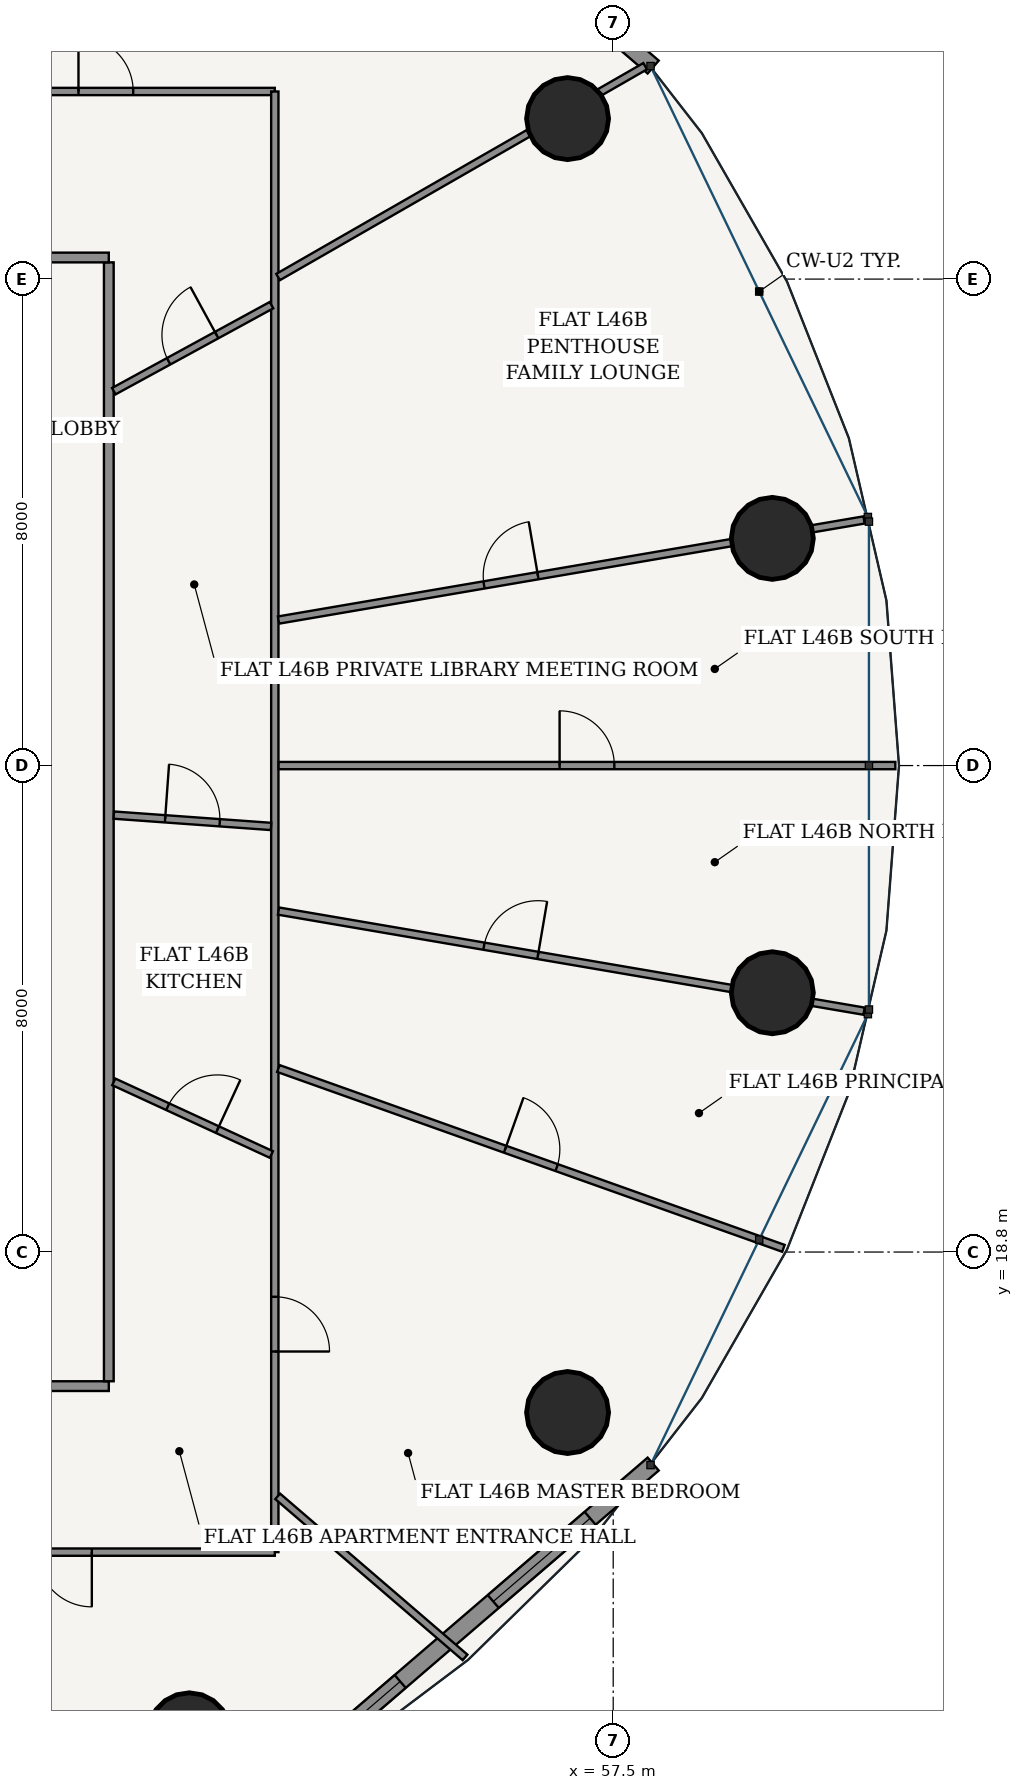
"""IFC4 building model, lengths in metres.
Left out: names, types, materials, properties, quantities, classifications, styles, units other than length and angle.
Written with IfcOpenShell. Run it as: python <this file> out.ifc"""

import sys

from ifc_helpers import new_model, si_unit, direction, frame, frame_2d, origin, origin_2d, place, context, subcontext, project, spatial, rectangle, hollow_circle, extrude, source, transform, mapped, element, fill, save


model = new_model("IFC4")
c1 = context("Model", 3, precision=1e-05, world=origin(), true_north=direction((-0.2419218956, 0.970295726276)))
c2 = subcontext(c1, "Body", "Model", "MODEL_VIEW")
j1 = project(units=[si_unit("LENGTHUNIT", "METRE"), si_unit("PLANEANGLEUNIT", "RADIAN")], contexts=[c1])
p1 = place(None, origin())
s1 = spatial("IfcSite", under=j1, at=p1, CompositionType="ELEMENT")
p2 = place(p1, origin())
s2 = spatial("IfcBuilding", under=s1, at=p2, CompositionType="ELEMENT")
p3 = place(p2, frame((0.0, 0.0, 175.0)))
s3 = spatial("IfcBuildingStorey", under=s2, at=p3, CompositionType="ELEMENT", Elevation=175.0)
for number, where, z_axis, x_axis in (
    (1, (60.117, 30.536, 0.0), (0.0, 0.0, 1.0), (1.0, 0.0, 0.0)),
    (2, (56.75, 37.439, 0.0), (0.0, 0.0, 1.0), (1.0, 0.0, 0.0)),
    (3, (50.528, 10.877, 0.0), (0.0, 0.0, 1.0), (1.0, 0.0, 0.0)),
    (4, (56.75, 16.161, 0.0), (0.0, 0.0, 1.0), (1.0, 0.0, 0.0)),
    (5, (60.117, 23.064, 0.0), (0.0, 0.0, 1.0), (1.0, 0.0, 0.0)),
):
    element("IfcColumn", number, at=place(p3, frame(where, z_axis=z_axis, x_axis=x_axis)), inside=s3, PredefinedType="COLUMN", context=c2, shape_type="SweptSolid", body=[
        extrude(hollow_circle(Radius=0.675, WallThickness=0.042, at=origin_2d()), origin(), (0.0, 0.0, 1.0), 3.6),
    ])
p4 = place(p3, frame((58.157, 38.287, 0.0), z_axis=(0.0, 0.0, 1.0), x_axis=(-0.75843401647, 0.651749831348, 0.0)))
e6 = element("IfcWall", 6, at=p4, inside=s3, PredefinedType="SOLIDWALL", context=c2, shape_type="SweptSolid", body=[
    extrude(rectangle(XDim=8.952, YDim=0.28, at=frame_2d((4.476, 0.0))), origin(), (0.0, 0.0, 1.0), 3.33),
])
p5 = place(p4, frame((1.367, 0.0, 0.85)))
e7 = element("IfcOpeningElement", 7, at=p5, cuts=e6, PredefinedType="OPENING", context=c2, shape_type="SweptSolid", body=[
    extrude(rectangle(XDim=2.1, YDim=1.95, at=frame_2d((1.05, 0.975))), frame((0.0, 0.15, 0.0), z_axis=(0.0, -1.0, 0.0), x_axis=(1.0, 0.0, 0.0)), (0.0, 0.0, 1.0), 0.3),
])
p6 = place(p4, frame((5.485, 0.0, 0.85)))
e8 = element("IfcOpeningElement", 8, at=p6, cuts=e6, PredefinedType="OPENING", context=c2, shape_type="SweptSolid", body=[
    extrude(rectangle(XDim=2.1, YDim=1.95, at=frame_2d((1.05, 0.975))), frame((0.0, 0.15, 0.0), z_axis=(0.0, -1.0, 0.0), x_axis=(1.0, 0.0, 0.0)), (0.0, 0.0, 1.0), 0.3),
])
p7 = place(p3, frame((51.367, 9.478, 0.0), z_axis=(0.0, 0.0, 1.0), x_axis=(0.75843401647, 0.651749831348, 0.0)))
e9 = element("IfcWall", 9, at=p7, inside=s3, PredefinedType="SOLIDWALL", context=c2, shape_type="SweptSolid", body=[
    extrude(rectangle(XDim=8.952, YDim=0.28, at=frame_2d((4.476, 0.0))), origin(), (0.0, 0.0, 1.0), 3.33),
])
p8 = place(p7, frame((1.367, 0.0, 0.85)))
e10 = element("IfcOpeningElement", 10, at=p8, cuts=e9, PredefinedType="OPENING", context=c2, shape_type="SweptSolid", body=[
    extrude(rectangle(XDim=2.1, YDim=1.95, at=frame_2d((1.05, 0.975))), frame((0.0, 0.15, 0.0), z_axis=(0.0, -1.0, 0.0), x_axis=(1.0, 0.0, 0.0)), (0.0, 0.0, 1.0), 0.3),
])
p9 = place(p7, frame((5.485, 0.0, 0.85)))
e11 = element("IfcOpeningElement", 11, at=p9, cuts=e9, PredefinedType="OPENING", context=c2, shape_type="SweptSolid", body=[
    extrude(rectangle(XDim=2.1, YDim=1.95, at=frame_2d((1.05, 0.975))), frame((0.0, 0.15, 0.0), z_axis=(0.0, -1.0, 0.0), x_axis=(1.0, 0.0, 0.0)), (0.0, 0.0, 1.0), 0.3),
])
p10 = place(p3, frame((34.32, 16.595, 0.0), z_axis=(0.0, 0.0, 1.0), x_axis=(1.0, 0.0, 0.0)))
e12 = element("IfcWall", 12, at=p10, inside=s3, PredefinedType="PARTITIONING", context=c2, shape_type="SweptSolid", body=[
    extrude(rectangle(XDim=14.885, YDim=0.16, at=frame_2d((7.442, 0.0))), origin(), (0.0, 0.0, 1.0), 2.776),
])
p11 = place(p10, frame((11.59, 0.0, 0.0)))
e13 = element("IfcOpeningElement", 13, at=p11, cuts=e12, PredefinedType="OPENING", context=c2, shape_type="SweptSolid", body=[
    extrude(rectangle(XDim=0.98, YDim=2.2, at=frame_2d((0.49, 1.1))), frame((0.0, 0.09, 0.0), z_axis=(0.0, -1.0, 0.0), x_axis=(1.0, 0.0, 0.0)), (0.0, 0.0, 1.0), 0.18),
])
p12 = place(p3, frame((49.205, 16.675, 0.0), z_axis=(0.0, 0.0, 1.0), x_axis=(0.0, 1.0, 0.0)))
e14 = element("IfcWall", 14, at=p12, inside=s3, PredefinedType="PARTITIONING", context=c2, shape_type="SweptSolid", body=[
    extrude(rectangle(XDim=18.4, YDim=0.16, at=frame_2d((9.2, 0.0))), origin(), (0.0, 0.0, 1.0), 2.776),
])
p13 = place(p3, frame((47.275, 35.155, 0.0), z_axis=(0.0, 0.0, 1.0), x_axis=(1.0, 0.0, 0.0)))
e15 = element("IfcWall", 15, at=p13, inside=s3, PredefinedType="PARTITIONING", context=c2, shape_type="SweptSolid", body=[
    extrude(rectangle(XDim=1.93, YDim=0.16, at=frame_2d((0.965, 0.0))), origin(), (0.0, 0.0, 1.0), 2.776),
])
p14 = place(p3, frame((44.465, 37.885, 0.0), z_axis=(0.0, 0.0, 1.0), x_axis=(1.0, 0.0, 0.0)))
e16 = element("IfcWall", 16, at=p14, inside=s3, PredefinedType="PARTITIONING", context=c2, shape_type="SweptSolid", body=[
    extrude(rectangle(XDim=7.47, YDim=0.12, at=frame_2d((3.735, 0.0))), origin(), (0.0, 0.0, 1.0), 2.776),
])
p15 = place(p14, frame((4.241, 0.0, 0.0)))
e17 = element("IfcOpeningElement", 17, at=p15, cuts=e16, PredefinedType="OPENING", context=c2, shape_type="SweptSolid", body=[
    extrude(rectangle(XDim=0.9, YDim=2.15, at=frame_2d((0.45, 1.075))), frame((0.0, 0.07, 0.0), z_axis=(0.0, -1.0, 0.0), x_axis=(1.0, 0.0, 0.0)), (0.0, 0.0, 1.0), 0.14),
])
p16 = place(p3, frame((51.935, 37.885, 0.0), z_axis=(0.0, 0.0, 1.0), x_axis=(0.0, -1.0, 0.0)))
e18 = element("IfcWall", 18, at=p16, inside=s3, PredefinedType="PARTITIONING", context=c2, shape_type="SweptSolid", body=[
    extrude(rectangle(XDim=24.02, YDim=0.12, at=frame_2d((12.01, 0.0))), origin(), (0.0, 0.0, 1.0), 2.776),
])
p17 = place(p16, frame((19.821, 0.0, 0.0)))
e19 = element("IfcOpeningElement", 19, at=p17, cuts=e18, PredefinedType="OPENING", context=c2, shape_type="SweptSolid", body=[
    extrude(rectangle(XDim=0.9, YDim=2.15, at=frame_2d((0.45, 1.075))), frame((0.0, 0.07, 0.0), z_axis=(0.0, -1.0, 0.0), x_axis=(1.0, 0.0, 0.0)), (0.0, 0.0, 1.0), 0.14),
])
p18 = place(p3, frame((51.935, 13.865, 0.0), z_axis=(0.0, 0.0, 1.0), x_axis=(-1.0, 0.0, 0.0)))
e20 = element("IfcWall", 20, at=p18, inside=s3, PredefinedType="PARTITIONING", context=c2, shape_type="SweptSolid", body=[
    extrude(rectangle(XDim=13.833, YDim=0.12, at=frame_2d((6.917, 0.0))), origin(), (0.0, 0.0, 1.0), 2.776),
])
p19 = place(p18, frame((3.009, 0.0, 0.0)))
e21 = element("IfcOpeningElement", 21, at=p19, cuts=e20, PredefinedType="OPENING", context=c2, shape_type="SweptSolid", body=[
    extrude(rectangle(XDim=0.9, YDim=2.15, at=frame_2d((0.45, 1.075))), frame((0.0, 0.07, 0.0), z_axis=(0.0, -1.0, 0.0), x_axis=(1.0, 0.0, 0.0)), (0.0, 0.0, 1.0), 0.14),
])
p20 = place(p3, frame((51.982, 14.782, 0.0), z_axis=(0.0, 0.0, 1.0), x_axis=(0.758356837469, -0.651839632935, 0.0)))
e22 = element("IfcWall", 22, at=p20, inside=s3, PredefinedType="PARTITIONING", context=c2, shape_type="SweptSolid", body=[
    extrude(rectangle(XDim=4.064, YDim=0.12, at=frame_2d((2.032, 0.0))), origin(), (0.0, 0.0, 1.0), 2.846),
])
p21 = place(p3, frame((51.993, 21.818, 0.0), z_axis=(0.0, 0.0, 1.0), x_axis=(0.942077868165, -0.335394231187, 0.0)))
e23 = element("IfcWall", 23, at=p21, inside=s3, PredefinedType="PARTITIONING", context=c2, shape_type="SweptSolid", body=[
    extrude(rectangle(XDim=8.817, YDim=0.12, at=frame_2d((4.408, 0.0))), origin(), (0.0, 0.0, 1.0), 2.846),
])
p22 = place(p21, frame((3.958, 0.0, 0.0)))
e24 = element("IfcOpeningElement", 24, at=p22, cuts=e23, PredefinedType="OPENING", context=c2, shape_type="SweptSolid", body=[
    extrude(rectangle(XDim=0.9, YDim=2.15, at=frame_2d((0.45, 1.075))), frame((0.0, 0.07, 0.0), z_axis=(0.0, -1.0, 0.0), x_axis=(1.0, 0.0, 0.0)), (0.0, 0.0, 1.0), 0.14),
])
p23 = place(p3, frame((51.996, 24.407, 0.0), z_axis=(0.0, 0.0, 1.0), x_axis=(0.985698378271, -0.168519159369, 0.0)))
e25 = element("IfcWall", 25, at=p23, inside=s3, PredefinedType="PARTITIONING", context=c2, shape_type="SweptSolid", body=[
    extrude(rectangle(XDim=9.769, YDim=0.12, at=frame_2d((4.884, 0.0))), origin(), (0.0, 0.0, 1.0), 2.776),
])
p24 = place(p23, frame((3.428, 0.0, 0.0)))
e26 = element("IfcOpeningElement", 26, at=p24, cuts=e25, PredefinedType="OPENING", context=c2, shape_type="SweptSolid", body=[
    extrude(rectangle(XDim=0.9, YDim=2.15, at=frame_2d((0.45, 1.075))), frame((0.0, 0.07, 0.0), z_axis=(0.0, -1.0, 0.0), x_axis=(1.0, 0.0, 0.0)), (0.0, 0.0, 1.0), 0.14),
])
p25 = place(p3, frame((51.997, 26.8, 0.0), z_axis=(0.0, 0.0, 1.0), x_axis=(1.0, 0.0, 0.0)))
e27 = element("IfcWall", 27, at=p25, inside=s3, PredefinedType="PARTITIONING", context=c2, shape_type="SweptSolid", body=[
    extrude(rectangle(XDim=10.143, YDim=0.12, at=frame_2d((5.071, 0.0))), origin(), (0.0, 0.0, 1.0), 2.846),
])
p26 = place(p25, frame((4.622, 0.0, 0.0)))
e28 = element("IfcOpeningElement", 28, at=p26, cuts=e27, PredefinedType="OPENING", context=c2, shape_type="SweptSolid", body=[
    extrude(rectangle(XDim=0.9, YDim=2.15, at=frame_2d((0.45, 1.075))), frame((0.0, 0.07, 0.0), z_axis=(0.0, -1.0, 0.0), x_axis=(1.0, 0.0, 0.0)), (0.0, 0.0, 1.0), 0.14),
])
p27 = place(p3, frame((51.996, 29.193, 0.0), z_axis=(0.0, 0.0, 1.0), x_axis=(0.985698378271, 0.168519159369, 0.0)))
e29 = element("IfcWall", 29, at=p27, inside=s3, PredefinedType="PARTITIONING", context=c2, shape_type="SweptSolid", body=[
    extrude(rectangle(XDim=9.769, YDim=0.12, at=frame_2d((4.884, 0.0))), origin(), (0.0, 0.0, 1.0), 2.776),
])
p28 = place(p27, frame((3.428, 0.0, 0.0)))
e30 = element("IfcOpeningElement", 30, at=p28, cuts=e29, PredefinedType="OPENING", context=c2, shape_type="SweptSolid", body=[
    extrude(rectangle(XDim=0.9, YDim=2.15, at=frame_2d((0.45, 1.075))), frame((0.0, 0.07, 0.0), z_axis=(0.0, -1.0, 0.0), x_axis=(1.0, 0.0, 0.0)), (0.0, 0.0, 1.0), 0.14),
])
p29 = place(p3, frame((51.989, 34.834, 0.0), z_axis=(0.0, 0.0, 1.0), x_axis=(0.86717064002, 0.498011125466, 0.0)))
e31 = element("IfcWall", 31, at=p29, inside=s3, PredefinedType="PARTITIONING", context=c2, shape_type="SweptSolid", body=[
    extrude(rectangle(XDim=6.961, YDim=0.12, at=frame_2d((3.48, 0.0))), origin(), (0.0, 0.0, 1.0), 2.776),
])
p30 = place(p3, frame((46.656, 37.934, 0.0), z_axis=(0.0, 0.0, 1.0), x_axis=(0.613758289074, 0.789493991487, 0.0)))
e32 = element("IfcWall", 32, at=p30, inside=s3, PredefinedType="PARTITIONING", context=c2, shape_type="SweptSolid", body=[
    extrude(rectangle(XDim=7.695, YDim=0.12, at=frame_2d((3.848, 0.0))), origin(), (0.0, 0.0, 1.0), 2.776),
])
p31 = place(p30, frame((2.399, 0.0, 0.0)))
e33 = element("IfcOpeningElement", 33, at=p31, cuts=e32, PredefinedType="OPENING", context=c2, shape_type="SweptSolid", body=[
    extrude(rectangle(XDim=0.9, YDim=2.15, at=frame_2d((0.45, 1.075))), frame((0.0, 0.07, 0.0), z_axis=(0.0, -1.0, 0.0), x_axis=(1.0, 0.0, 0.0)), (0.0, 0.0, 1.0), 0.14),
])
p32 = place(p3, frame((49.287, 21.598, 0.0), z_axis=(0.0, 0.0, 1.0), x_axis=(0.908177096136, -0.418586146514, 0.0)))
e34 = element("IfcWall", 34, at=p32, inside=s3, PredefinedType="PARTITIONING", context=c2, shape_type="SweptSolid", body=[
    extrude(rectangle(XDim=2.854, YDim=0.12, at=frame_2d((1.427, 0.0))), origin(), (0.0, 0.0, 1.0), 3.33),
])
p33 = place(p32, frame((0.977, 0.0, 0.0)))
e35 = element("IfcOpeningElement", 35, at=p33, cuts=e34, PredefinedType="OPENING", context=c2, shape_type="SweptSolid", body=[
    extrude(rectangle(XDim=0.9, YDim=2.15, at=frame_2d((0.45, 1.075))), frame((0.0, 0.07, 0.0), z_axis=(0.0, -1.0, 0.0), x_axis=(1.0, 0.0, 0.0)), (0.0, 0.0, 1.0), 0.14),
])
p34 = place(p3, frame((49.287, 25.985, 0.0), z_axis=(0.0, 0.0, 1.0), x_axis=(0.997408744903, -0.07194300237, 0.0)))
e36 = element("IfcWall", 36, at=p34, inside=s3, PredefinedType="PARTITIONING", context=c2, shape_type="SweptSolid", body=[
    extrude(rectangle(XDim=2.593, YDim=0.12, at=frame_2d((1.296, 0.0))), origin(), (0.0, 0.0, 1.0), 3.33),
])
p35 = place(p34, frame((0.846, 0.0, 0.0)))
e37 = element("IfcOpeningElement", 37, at=p35, cuts=e36, PredefinedType="OPENING", context=c2, shape_type="SweptSolid", body=[
    extrude(rectangle(XDim=0.9, YDim=2.15, at=frame_2d((0.45, 1.075))), frame((0.0, 0.07, 0.0), z_axis=(0.0, -1.0, 0.0), x_axis=(1.0, 0.0, 0.0)), (0.0, 0.0, 1.0), 0.14),
])
p36 = place(p3, frame((49.287, 32.957, 0.0), z_axis=(0.0, 0.0, 1.0), x_axis=(0.877892414948, 0.47885792024, 0.0)))
e38 = element("IfcWall", 38, at=p36, inside=s3, PredefinedType="PARTITIONING", context=c2, shape_type="SweptSolid", body=[
    extrude(rectangle(XDim=2.955, YDim=0.12, at=frame_2d((1.477, 0.0))), origin(), (0.0, 0.0, 1.0), 3.33),
])
p37 = place(p36, frame((1.027, 0.0, 0.0)))
e39 = element("IfcOpeningElement", 39, at=p37, cuts=e38, PredefinedType="OPENING", context=c2, shape_type="SweptSolid", body=[
    extrude(rectangle(XDim=0.9, YDim=2.15, at=frame_2d((0.45, 1.075))), frame((0.0, 0.07, 0.0), z_axis=(0.0, -1.0, 0.0), x_axis=(1.0, 0.0, 0.0)), (0.0, 0.0, 1.0), 0.14),
])
m1 = source(origin(), c2, "Body", "SweptSolid", [
    extrude(rectangle(XDim=2.1, YDim=1.95, at=frame_2d((1.05, 0.975))), frame((0.0, 0.03, 0.0), z_axis=(0.0, -1.0, 0.0), x_axis=(1.0, 0.0, 0.0)), (0.0, 0.0, 1.0), 0.06),
])
p38 = place(p8, origin())
e40 = element("IfcWindow", 40, at=p38, inside=s3, PartitioningType="SINGLE_PANEL", PredefinedType="WINDOW", context=c2, shape_type="MappedRepresentation", body=[
    mapped(m1, transform((0.0, 0.0, 0.0), scale=1.0)),
])
fill(e10, e40)
p39 = place(p9, origin())
e41 = element("IfcWindow", 41, at=p39, inside=s3, PartitioningType="SINGLE_PANEL", PredefinedType="WINDOW", context=c2, shape_type="MappedRepresentation", body=[
    mapped(m1, transform((0.0, 0.0, 0.0), scale=1.0)),
])
fill(e11, e41)
m2 = source(origin(), c2, "Body", "SweptSolid", [
    extrude(rectangle(XDim=0.9, YDim=2.15, at=frame_2d((0.45, 1.075))), frame((0.0, 0.025, 0.0), z_axis=(0.0, -1.0, 0.0), x_axis=(1.0, 0.0, 0.0)), (0.0, 0.0, 1.0), 0.05),
])
p40 = place(p19, origin())
e42 = element("IfcDoor", 42, at=p40, inside=s3, OperationType="SINGLE_SWING_LEFT", PredefinedType="DOOR", context=c2, shape_type="MappedRepresentation", body=[
    mapped(m2, transform((0.0, 0.0, 0.0), scale=1.0)),
])
fill(e21, e42)
p41 = place(p33, origin())
e43 = element("IfcDoor", 43, at=p41, inside=s3, OperationType="SINGLE_SWING_RIGHT", PredefinedType="DOOR", context=c2, shape_type="MappedRepresentation", body=[
    mapped(m2, transform((0.0, 0.0, 0.0), scale=1.0)),
])
fill(e35, e43)
p42 = place(p35, origin())
e44 = element("IfcDoor", 44, at=p42, inside=s3, OperationType="SINGLE_SWING_LEFT", PredefinedType="DOOR", context=c2, shape_type="MappedRepresentation", body=[
    mapped(m2, transform((0.0, 0.0, 0.0), scale=1.0)),
])
fill(e37, e44)
p43 = place(p37, origin())
e45 = element("IfcDoor", 45, at=p43, inside=s3, OperationType="SINGLE_SWING_RIGHT", PredefinedType="DOOR", context=c2, shape_type="MappedRepresentation", body=[
    mapped(m2, transform((0.0, 0.0, 0.0), scale=1.0)),
])
fill(e39, e45)
p44 = place(p17, origin())
e46 = element("IfcDoor", 46, at=p44, inside=s3, OperationType="SINGLE_SWING_RIGHT", PredefinedType="DOOR", context=c2, shape_type="MappedRepresentation", body=[
    mapped(m2, transform((0.0, 0.0, 0.0), scale=1.0)),
])
fill(e19, e46)
p45 = place(p22, origin())
e47 = element("IfcDoor", 47, at=p45, inside=s3, OperationType="SINGLE_SWING_LEFT", PredefinedType="DOOR", context=c2, shape_type="MappedRepresentation", body=[
    mapped(m2, transform((0.0, 0.0, 0.0), scale=1.0)),
])
fill(e24, e47)
p46 = place(p24, origin())
e48 = element("IfcDoor", 48, at=p46, inside=s3, OperationType="SINGLE_SWING_RIGHT", PredefinedType="DOOR", context=c2, shape_type="MappedRepresentation", body=[
    mapped(m2, transform((0.0, 0.0, 0.0), scale=1.0)),
])
fill(e26, e48)
p47 = place(p26, origin())
e49 = element("IfcDoor", 49, at=p47, inside=s3, OperationType="SINGLE_SWING_LEFT", PredefinedType="DOOR", context=c2, shape_type="MappedRepresentation", body=[
    mapped(m2, transform((0.0, 0.0, 0.0), scale=1.0)),
])
fill(e28, e49)
p48 = place(p28, origin())
e50 = element("IfcDoor", 50, at=p48, inside=s3, OperationType="SINGLE_SWING_RIGHT", PredefinedType="DOOR", context=c2, shape_type="MappedRepresentation", body=[
    mapped(m2, transform((0.0, 0.0, 0.0), scale=1.0)),
])
fill(e30, e50)
p49 = place(p15, origin())
e51 = element("IfcDoor", 51, at=p49, inside=s3, OperationType="SINGLE_SWING_LEFT", PredefinedType="DOOR", context=c2, shape_type="MappedRepresentation", body=[
    mapped(m2, transform((0.0, 0.0, 0.0), scale=1.0)),
])
fill(e17, e51)
save(model, sys.argv[1])
